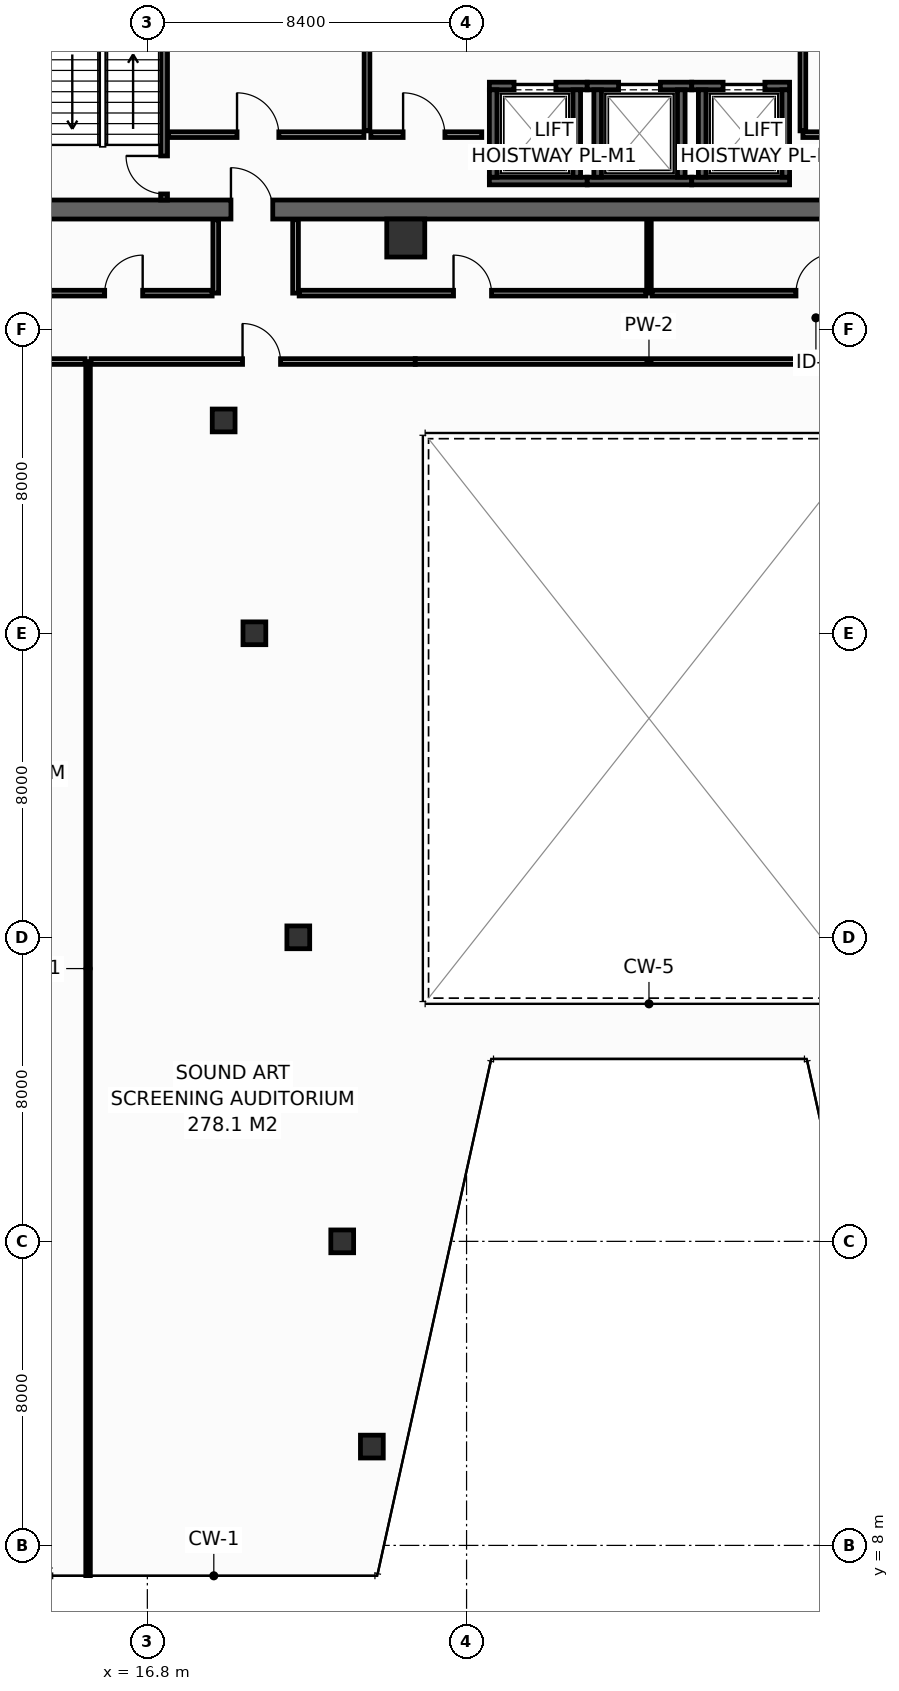
"""IFC4 building model, lengths in metres.
Left out: names, types, materials, properties, quantities, classifications, styles, units other than length and angle.
Written with IfcOpenShell. Run it as: python <this file> out.ifc"""

import sys

from ifc_helpers import new_model, si_unit, direction, frame, frame_2d, origin, origin_2d, place, context, subcontext, project, spatial, rectangle, hollow_rectangle, extrude, element, fill, save


model = new_model("IFC4")
c1 = context("Model", 3, precision=1e-05, world=origin(), true_north=direction((0.0, 1.0)))
c2 = subcontext(c1, "Body", "Model", "MODEL_VIEW")
j1 = project(units=[si_unit("LENGTHUNIT", "METRE"), si_unit("PLANEANGLEUNIT", "RADIAN")], contexts=[c1])
p1 = place(None, origin())
s1 = spatial("IfcSite", under=j1, at=p1, CompositionType="ELEMENT")
p2 = place(p1, origin())
s2 = spatial("IfcBuilding", under=s1, at=p2, CompositionType="ELEMENT")
p3 = place(p2, frame((0.0, 0.0, 148.6)))
s3 = spatial("IfcBuildingStorey", under=s2, at=p3, CompositionType="ELEMENT", Elevation=148.6)
p4 = place(p3, frame((13.6, 43.15, 0.0), z_axis=(0.0, 0.0, 1.0), x_axis=(1.0, 0.0, 0.0)))
e1 = element("IfcWall", 1, at=p4, inside=s3, PredefinedType="SHEAR", context=c2, shape_type="SweptSolid", body=[
    extrude(rectangle(XDim=32.7, YDim=0.5, at=frame_2d((16.35, 0.0))), origin(), (0.0, 0.0, 1.0), 3.55),
])
p5 = place(p4, frame((5.4, 0.0, 0.0)))
e2 = element("IfcOpeningElement", 2, at=p5, cuts=e1, PredefinedType="OPENING", context=c2, shape_type="SweptSolid", body=[
    extrude(rectangle(XDim=1.1, YDim=2.15, at=frame_2d((0.55, 1.075))), frame((0.0, 0.26, 0.0), z_axis=(0.0, -1.0, 0.0), x_axis=(1.0, 0.0, 0.0)), (0.0, 0.0, 1.0), 0.52),
])
p6 = place(p4, frame((25.6, 0.0, 0.0)))
e3 = element("IfcOpeningElement", 3, at=p6, cuts=e1, PredefinedType="OPENING", context=c2, shape_type="SweptSolid", body=[
    extrude(rectangle(XDim=1.1, YDim=2.15, at=frame_2d((0.55, 1.075))), frame((0.0, 0.26, 0.0), z_axis=(0.0, -1.0, 0.0), x_axis=(1.0, 0.0, 0.0)), (0.0, 0.0, 1.0), 0.52),
])
p7 = place(p3, frame((23.6, 42.4, 0.0), z_axis=(0.0, 0.0, 1.0), x_axis=(1.0, 0.0, 0.0)))
e4 = element("IfcColumn", 4, at=p7, inside=s3, PredefinedType="COLUMN", context=c2, shape_type="SweptSolid", body=[
    extrude(hollow_rectangle(XDim=1.0, YDim=1.0, WallThickness=0.045, at=origin_2d()), origin(), (0.0, 0.0, 1.0), 3.8),
])
for number, where, z_axis, x_axis in (
    (5, (22.708, 10.6, 0.0), (0.0, 0.0, 1.0), (1.0, 0.0, 0.0)),
    (6, (21.928, 16.0, 0.0), (0.0, 0.0, 1.0), (1.0, 0.0, 0.0)),
    (7, (20.772, 24.0, 0.0), (0.0, 0.0, 1.0), (1.0, 0.0, 0.0)),
    (8, (19.617, 32.0, 0.0), (0.0, 0.0, 1.0), (1.0, 0.0, 0.0)),
    (9, (18.808, 37.6, 0.0), (0.0, 0.0, 1.0), (1.0, 0.0, 0.0)),
):
    element("IfcColumn", number, at=place(p3, frame(where, z_axis=z_axis, x_axis=x_axis)), inside=s3, PredefinedType="COLUMN", context=c2, shape_type="SweptSolid", body=[
        extrude(hollow_rectangle(XDim=0.6, YDim=0.6, WallThickness=0.028, at=origin_2d()), origin(), (0.0, 0.0, 1.0), 3.8),
    ])
p8 = place(p3, frame((25.8, 43.9, 0.0), z_axis=(0.0, 0.0, 1.0), x_axis=(1.0, 0.0, 0.0)))
e10 = element("IfcWall", 10, at=p8, inside=s3, PredefinedType="SHEAR", context=c2, shape_type="SweptSolid", body=[
    extrude(rectangle(XDim=2.575, YDim=0.2, at=frame_2d((1.288, 0.0))), origin(), (0.0, 0.0, 1.0), 3.55),
])
p9 = place(p3, frame((25.8, 46.4, 0.0), z_axis=(0.0, 0.0, 1.0), x_axis=(1.0, 0.0, 0.0)))
e11 = element("IfcWall", 11, at=p9, inside=s3, PredefinedType="SHEAR", context=c2, shape_type="SweptSolid", body=[
    extrude(rectangle(XDim=2.575, YDim=0.2, at=frame_2d((1.288, 0.0))), origin(), (0.0, 0.0, 1.0), 3.55),
])
p10 = place(p9, frame((0.65, 0.0, 0.0)))
e12 = element("IfcOpeningElement", 12, at=p10, cuts=e11, PredefinedType="OPENING", context=c2, shape_type="SweptSolid", body=[
    extrude(rectangle(XDim=1.1, YDim=2.2, at=frame_2d((0.55, 1.1))), frame((0.0, 0.11, 0.0), z_axis=(0.0, -1.0, 0.0), x_axis=(1.0, 0.0, 0.0)), (0.0, 0.0, 1.0), 0.22),
])
for number, where, z_axis, x_axis in (
    (13, (25.9, 44.0, 0.0), (0.0, 0.0, 1.0), (0.0, 1.0, 0.0)),
    (14, (28.1, 44.0, 0.0), (0.0, 0.0, 1.0), (0.0, 1.0, 0.0)),
):
    element("IfcWall", number, at=place(p3, frame(where, z_axis=z_axis, x_axis=x_axis)), inside=s3, PredefinedType="SHEAR", context=c2, shape_type="SweptSolid", body=[
        extrude(rectangle(XDim=2.3, YDim=0.2, at=frame_2d((1.15, 0.0))), origin(), (0.0, 0.0, 1.0), 3.55),
    ])
p11 = place(p3, frame((28.375, 43.9, 0.0), z_axis=(0.0, 0.0, 1.0), x_axis=(1.0, 0.0, 0.0)))
e15 = element("IfcWall", 15, at=p11, inside=s3, PredefinedType="SHEAR", context=c2, shape_type="SweptSolid", body=[
    extrude(rectangle(XDim=2.75, YDim=0.2, at=frame_2d((1.375, 0.0))), origin(), (0.0, 0.0, 1.0), 3.55),
])
p12 = place(p3, frame((28.375, 46.4, 0.0), z_axis=(0.0, 0.0, 1.0), x_axis=(1.0, 0.0, 0.0)))
e16 = element("IfcWall", 16, at=p12, inside=s3, PredefinedType="SHEAR", context=c2, shape_type="SweptSolid", body=[
    extrude(rectangle(XDim=2.75, YDim=0.2, at=frame_2d((1.375, 0.0))), origin(), (0.0, 0.0, 1.0), 3.55),
])
p13 = place(p12, frame((0.825, 0.0, 0.0)))
e17 = element("IfcOpeningElement", 17, at=p13, cuts=e16, PredefinedType="OPENING", context=c2, shape_type="SweptSolid", body=[
    extrude(rectangle(XDim=1.1, YDim=2.2, at=frame_2d((0.55, 1.1))), frame((0.0, 0.11, 0.0), z_axis=(0.0, -1.0, 0.0), x_axis=(1.0, 0.0, 0.0)), (0.0, 0.0, 1.0), 0.22),
])
for number, where, z_axis, x_axis in (
    (18, (28.65, 44.0, 0.0), (0.0, 0.0, 1.0), (0.0, 1.0, 0.0)),
    (19, (30.85, 44.0, 0.0), (0.0, 0.0, 1.0), (0.0, 1.0, 0.0)),
):
    element("IfcWall", number, at=place(p3, frame(where, z_axis=z_axis, x_axis=x_axis)), inside=s3, PredefinedType="SHEAR", context=c2, shape_type="SweptSolid", body=[
        extrude(rectangle(XDim=2.3, YDim=0.2, at=frame_2d((1.15, 0.0))), origin(), (0.0, 0.0, 1.0), 3.55),
    ])
p14 = place(p3, frame((31.125, 43.9, 0.0), z_axis=(0.0, 0.0, 1.0), x_axis=(1.0, 0.0, 0.0)))
e20 = element("IfcWall", 20, at=p14, inside=s3, PredefinedType="SHEAR", context=c2, shape_type="SweptSolid", body=[
    extrude(rectangle(XDim=2.575, YDim=0.2, at=frame_2d((1.288, 0.0))), origin(), (0.0, 0.0, 1.0), 3.55),
])
p15 = place(p3, frame((31.125, 46.4, 0.0), z_axis=(0.0, 0.0, 1.0), x_axis=(1.0, 0.0, 0.0)))
e21 = element("IfcWall", 21, at=p15, inside=s3, PredefinedType="SHEAR", context=c2, shape_type="SweptSolid", body=[
    extrude(rectangle(XDim=2.575, YDim=0.2, at=frame_2d((1.288, 0.0))), origin(), (0.0, 0.0, 1.0), 3.55),
])
p16 = place(p15, frame((0.825, 0.0, 0.0)))
e22 = element("IfcOpeningElement", 22, at=p16, cuts=e21, PredefinedType="OPENING", context=c2, shape_type="SweptSolid", body=[
    extrude(rectangle(XDim=1.1, YDim=2.2, at=frame_2d((0.55, 1.1))), frame((0.0, 0.11, 0.0), z_axis=(0.0, -1.0, 0.0), x_axis=(1.0, 0.0, 0.0)), (0.0, 0.0, 1.0), 0.22),
])
for number, where, z_axis, x_axis in (
    (23, (31.4, 44.0, 0.0), (0.0, 0.0, 1.0), (0.0, 1.0, 0.0)),
    (24, (33.6, 44.0, 0.0), (0.0, 0.0, 1.0), (0.0, 1.0, 0.0)),
):
    element("IfcWall", number, at=place(p3, frame(where, z_axis=z_axis, x_axis=x_axis)), inside=s3, PredefinedType="SHEAR", context=c2, shape_type="SweptSolid", body=[
        extrude(rectangle(XDim=2.3, YDim=0.2, at=frame_2d((1.15, 0.0))), origin(), (0.0, 0.0, 1.0), 3.55),
    ])
p17 = place(p3, frame((17.24, 43.4, 0.0), z_axis=(0.0, 0.0, 1.0), x_axis=(0.0, 1.0, 0.0)))
e25 = element("IfcWall", 25, at=p17, inside=s3, PredefinedType="SHEAR", context=c2, shape_type="SweptSolid", body=[
    extrude(rectangle(XDim=10.4, YDim=0.18, at=frame_2d((5.2, 0.0))), origin(), (0.0, 0.0, 1.0), 3.55),
])
p18 = place(p17, frame((0.16, 0.0, 0.0)))
e26 = element("IfcOpeningElement", 26, at=p18, cuts=e25, PredefinedType="OPENING", context=c2, shape_type="SweptSolid", body=[
    extrude(rectangle(XDim=1.0, YDim=2.15, at=frame_2d((0.5, 1.075))), frame((0.0, 0.1, 0.0), z_axis=(0.0, -1.0, 0.0), x_axis=(1.0, 0.0, 0.0)), (0.0, 0.0, 1.0), 0.2),
])
p19 = place(p3, frame((17.36, 45.12, 0.0), z_axis=(0.0, 0.0, 1.0), x_axis=(1.0, 0.0, 0.0)))
e27 = element("IfcWall", 27, at=p19, inside=s3, PredefinedType="PARTITIONING", context=c2, shape_type="SweptSolid", body=[
    extrude(rectangle(XDim=5.14, YDim=0.15, at=frame_2d((2.57, 0.0))), origin(), (0.0, 0.0, 1.0), 3.55),
])
p20 = place(p19, frame((1.8, 0.0, 0.0)))
e28 = element("IfcOpeningElement", 28, at=p20, cuts=e27, PredefinedType="OPENING", context=c2, shape_type="SweptSolid", body=[
    extrude(rectangle(XDim=1.1, YDim=2.15, at=frame_2d((0.55, 1.075))), frame((0.0, 0.085, 0.0), z_axis=(0.0, -1.0, 0.0), x_axis=(1.0, 0.0, 0.0)), (0.0, 0.0, 1.0), 0.17),
])
p21 = place(p3, frame((22.58, 50.55, 0.0), z_axis=(0.0, 0.0, 1.0), x_axis=(0.0, -1.0, 0.0)))
e29 = element("IfcWall", 29, at=p21, inside=s3, PredefinedType="PARTITIONING", context=c2, shape_type="SweptSolid", body=[
    extrude(rectangle(XDim=5.33, YDim=0.15, at=frame_2d((2.665, 0.0))), origin(), (0.0, 0.0, 1.0), 3.55),
])
p22 = place(p21, frame((1.8, 0.0, 0.0)))
e30 = element("IfcOpeningElement", 30, at=p22, cuts=e29, PredefinedType="OPENING", context=c2, shape_type="SweptSolid", body=[
    extrude(rectangle(XDim=1.1, YDim=2.15, at=frame_2d((0.55, 1.075))), frame((0.0, 0.085, 0.0), z_axis=(0.0, -1.0, 0.0), x_axis=(1.0, 0.0, 0.0)), (0.0, 0.0, 1.0), 0.17),
])
p23 = place(p3, frame((22.68, 45.12, 0.0), z_axis=(0.0, 0.0, 1.0), x_axis=(1.0, 0.0, 0.0)))
e31 = element("IfcWall", 31, at=p23, inside=s3, PredefinedType="PARTITIONING", context=c2, shape_type="SweptSolid", body=[
    extrude(rectangle(XDim=2.92, YDim=0.15, at=frame_2d((1.46, 0.0))), origin(), (0.0, 0.0, 1.0), 3.55),
])
p24 = place(p23, frame((0.85, 0.0, 0.0)))
e32 = element("IfcOpeningElement", 32, at=p24, cuts=e31, PredefinedType="OPENING", context=c2, shape_type="SweptSolid", body=[
    extrude(rectangle(XDim=1.1, YDim=2.15, at=frame_2d((0.55, 1.075))), frame((0.0, 0.085, 0.0), z_axis=(0.0, -1.0, 0.0), x_axis=(1.0, 0.0, 0.0)), (0.0, 0.0, 1.0), 0.17),
])
p25 = place(p3, frame((34.05, 45.12, 0.0), z_axis=(0.0, 0.0, 1.0), x_axis=(1.0, 0.0, 0.0)))
e33 = element("IfcWall", 33, at=p25, inside=s3, PredefinedType="PARTITIONING", context=c2, shape_type="SweptSolid", body=[
    extrude(rectangle(XDim=8.45, YDim=0.15, at=frame_2d((4.225, 0.0))), origin(), (0.0, 0.0, 1.0), 3.55),
])
p26 = place(p25, frame((3.6, 0.0, 0.0)))
e34 = element("IfcOpeningElement", 34, at=p26, cuts=e33, PredefinedType="OPENING", context=c2, shape_type="SweptSolid", body=[
    extrude(rectangle(XDim=0.95, YDim=2.15, at=frame_2d((0.475, 1.075))), frame((0.0, 0.085, 0.0), z_axis=(0.0, -1.0, 0.0), x_axis=(1.0, 0.0, 0.0)), (0.0, 0.0, 1.0), 0.17),
])
p27 = place(p3, frame((34.05, 45.22, 0.0), z_axis=(0.0, 0.0, 1.0), x_axis=(0.0, 1.0, 0.0)))
e35 = element("IfcWall", 35, at=p27, inside=s3, PredefinedType="PARTITIONING", context=c2, shape_type="SweptSolid", body=[
    extrude(rectangle(XDim=2.43, YDim=0.15, at=frame_2d((1.215, 0.0))), origin(), (0.0, 0.0, 1.0), 3.55),
])
for number, where, z_axis, x_axis in (
    (36, (18.6, 40.95, 0.0), (0.0, 0.0, 1.0), (0.0, 1.0, 0.0)),
    (37, (20.7, 40.95, 0.0), (0.0, 0.0, 1.0), (0.0, 1.0, 0.0)),
):
    element("IfcWall", number, at=place(p3, frame(where, z_axis=z_axis, x_axis=x_axis)), inside=s3, PredefinedType="PARTITIONING", context=c2, shape_type="SweptSolid", body=[
        extrude(rectangle(XDim=1.93, YDim=0.15, at=frame_2d((0.965, 0.0))), origin(), (0.0, 0.0, 1.0), 3.55),
    ])
p28 = place(p3, frame((13.85, 40.95, 0.0), z_axis=(0.0, 0.0, 1.0), x_axis=(1.0, 0.0, 0.0)))
e38 = element("IfcWall", 38, at=p28, inside=s3, PredefinedType="PARTITIONING", context=c2, shape_type="SweptSolid", body=[
    extrude(rectangle(XDim=4.655, YDim=0.15, at=frame_2d((2.327, 0.0))), origin(), (0.0, 0.0, 1.0), 3.55),
])
p29 = place(p28, frame((1.827, 0.0, 0.0)))
e39 = element("IfcOpeningElement", 39, at=p29, cuts=e38, PredefinedType="OPENING", context=c2, shape_type="SweptSolid", body=[
    extrude(rectangle(XDim=1.0, YDim=2.15, at=frame_2d((0.5, 1.075))), frame((0.0, 0.085, 0.0), z_axis=(0.0, -1.0, 0.0), x_axis=(1.0, 0.0, 0.0)), (0.0, 0.0, 1.0), 0.17),
])
p30 = place(p3, frame((30.0, 40.95, 0.0), z_axis=(0.0, 0.0, 1.0), x_axis=(0.0, 1.0, 0.0)))
e40 = element("IfcWall", 40, at=p30, inside=s3, PredefinedType="PARTITIONING", context=c2, shape_type="SweptSolid", body=[
    extrude(rectangle(XDim=1.93, YDim=0.12, at=frame_2d((0.965, 0.0))), origin(), (0.0, 0.0, 1.0), 2.835),
])
p31 = place(p3, frame((20.795, 40.95, 0.0), z_axis=(0.0, 0.0, 1.0), x_axis=(1.0, 0.0, 0.0)))
e41 = element("IfcWall", 41, at=p31, inside=s3, PredefinedType="PARTITIONING", context=c2, shape_type="SweptSolid", body=[
    extrude(rectangle(XDim=9.125, YDim=0.15, at=frame_2d((4.562, 0.0))), origin(), (0.0, 0.0, 1.0), 2.835),
])
p32 = place(p31, frame((4.062, 0.0, 0.0)))
e42 = element("IfcOpeningElement", 42, at=p32, cuts=e41, PredefinedType="OPENING", context=c2, shape_type="SweptSolid", body=[
    extrude(rectangle(XDim=1.0, YDim=2.15, at=frame_2d((0.5, 1.075))), frame((0.0, 0.085, 0.0), z_axis=(0.0, -1.0, 0.0), x_axis=(1.0, 0.0, 0.0)), (0.0, 0.0, 1.0), 0.17),
])
p33 = place(p3, frame((30.08, 40.95, 0.0), z_axis=(0.0, 0.0, 1.0), x_axis=(1.0, 0.0, 0.0)))
e43 = element("IfcWall", 43, at=p33, inside=s3, PredefinedType="PARTITIONING", context=c2, shape_type="SweptSolid", body=[
    extrude(rectangle(XDim=8.625, YDim=0.15, at=frame_2d((4.312, 0.0))), origin(), (0.0, 0.0, 1.0), 2.835),
])
p34 = place(p33, frame((3.788, 0.0, 0.0)))
e44 = element("IfcOpeningElement", 44, at=p34, cuts=e43, PredefinedType="OPENING", context=c2, shape_type="SweptSolid", body=[
    extrude(rectangle(XDim=1.05, YDim=2.15, at=frame_2d((0.525, 1.075))), frame((0.0, 0.085, 0.0), z_axis=(0.0, -1.0, 0.0), x_axis=(1.0, 0.0, 0.0)), (0.0, 0.0, 1.0), 0.17),
])
p35 = place(p3, frame((15.24, 7.205, 0.0), z_axis=(0.0, 0.0, 1.0), x_axis=(0.0, 1.0, 0.0)))
e45 = element("IfcWall", 45, at=p35, inside=s3, PredefinedType="PARTITIONING", context=c2, shape_type="SweptSolid", body=[
    extrude(rectangle(XDim=31.945, YDim=0.12, at=frame_2d((15.972, 0.0))), origin(), (0.0, 0.0, 1.0), 2.835),
])
p36 = place(p3, frame((6.334, 39.15, 0.0), z_axis=(0.0, 0.0, 1.0), x_axis=(1.0, 0.0, 0.0)))
e46 = element("IfcWall", 46, at=p36, inside=s3, PredefinedType="PARTITIONING", context=c2, shape_type="SweptSolid", body=[
    extrude(rectangle(XDim=8.826, YDim=0.15, at=frame_2d((4.413, 0.0))), origin(), (0.0, 0.0, 1.0), 3.035),
])
p37 = place(p36, frame((3.913, 0.0, 0.0)))
e47 = element("IfcOpeningElement", 47, at=p37, cuts=e46, PredefinedType="OPENING", context=c2, shape_type="SweptSolid", body=[
    extrude(rectangle(XDim=1.0, YDim=2.15, at=frame_2d((0.5, 1.075))), frame((0.0, 0.085, 0.0), z_axis=(0.0, -1.0, 0.0), x_axis=(1.0, 0.0, 0.0)), (0.0, 0.0, 1.0), 0.17),
])
p38 = place(p3, frame((15.32, 39.15, 0.0), z_axis=(0.0, 0.0, 1.0), x_axis=(1.0, 0.0, 0.0)))
e48 = element("IfcWall", 48, at=p38, inside=s3, PredefinedType="PARTITIONING", context=c2, shape_type="SweptSolid", body=[
    extrude(rectangle(XDim=8.53, YDim=0.15, at=frame_2d((4.265, 0.0))), origin(), (0.0, 0.0, 1.0), 2.835),
])
p39 = place(p38, frame((3.985, 0.0, 0.0)))
e49 = element("IfcOpeningElement", 49, at=p39, cuts=e48, PredefinedType="OPENING", context=c2, shape_type="SweptSolid", body=[
    extrude(rectangle(XDim=1.0, YDim=2.15, at=frame_2d((0.5, 1.075))), frame((0.0, 0.085, 0.0), z_axis=(0.0, -1.0, 0.0), x_axis=(1.0, 0.0, 0.0)), (0.0, 0.0, 1.0), 0.17),
])
p40 = place(p3, frame((23.85, 39.15, 0.0), z_axis=(0.0, 0.0, 1.0), x_axis=(1.0, 0.0, 0.0)))
e50 = element("IfcWall", 50, at=p40, inside=s3, PredefinedType="PARTITIONING", context=c2, shape_type="SweptSolid", body=[
    extrude(rectangle(XDim=12.3, YDim=0.15, at=frame_2d((6.15, 0.0))), origin(), (0.0, 0.0, 1.0), 3.55),
])
p41 = place(p10, origin())
e51 = element("IfcDoor", 51, at=p41, inside=s3, OperationType="SLIDING_TO_LEFT", PredefinedType="DOOR", context=c2, shape_type="SweptSolid", body=[
    extrude(rectangle(XDim=1.1, YDim=2.2, at=frame_2d((0.55, 1.1))), frame((0.0, 0.025, 0.0), z_axis=(0.0, -1.0, 0.0), x_axis=(1.0, 0.0, 0.0)), (0.0, 0.0, 1.0), 0.05),
])
fill(e12, e51)
p42 = place(p13, origin())
e52 = element("IfcDoor", 52, at=p42, inside=s3, OperationType="SLIDING_TO_LEFT", PredefinedType="DOOR", context=c2, shape_type="SweptSolid", body=[
    extrude(rectangle(XDim=1.1, YDim=2.2, at=frame_2d((0.55, 1.1))), frame((0.0, 0.025, 0.0), z_axis=(0.0, -1.0, 0.0), x_axis=(1.0, 0.0, 0.0)), (0.0, 0.0, 1.0), 0.05),
])
fill(e17, e52)
p43 = place(p16, origin())
e53 = element("IfcDoor", 53, at=p43, inside=s3, OperationType="SLIDING_TO_LEFT", PredefinedType="DOOR", context=c2, shape_type="SweptSolid", body=[
    extrude(rectangle(XDim=1.1, YDim=2.2, at=frame_2d((0.55, 1.1))), frame((0.0, 0.025, 0.0), z_axis=(0.0, -1.0, 0.0), x_axis=(1.0, 0.0, 0.0)), (0.0, 0.0, 1.0), 0.05),
])
fill(e22, e53)
p44 = place(p18, origin())
e54 = element("IfcDoor", 54, at=p44, inside=s3, OperationType="SINGLE_SWING_RIGHT", PredefinedType="DOOR", context=c2, shape_type="SweptSolid", body=[
    extrude(rectangle(XDim=1.0, YDim=2.15, at=frame_2d((0.5, 1.075))), frame((0.0, 0.025, 0.0), z_axis=(0.0, -1.0, 0.0), x_axis=(1.0, 0.0, 0.0)), (0.0, 0.0, 1.0), 0.05),
])
fill(e26, e54)
p45 = place(p20, origin())
e55 = element("IfcDoor", 55, at=p45, inside=s3, OperationType="SINGLE_SWING_LEFT", PredefinedType="DOOR", context=c2, shape_type="SweptSolid", body=[
    extrude(rectangle(XDim=1.1, YDim=2.15, at=frame_2d((0.55, 1.075))), frame((0.0, 0.025, 0.0), z_axis=(0.0, -1.0, 0.0), x_axis=(1.0, 0.0, 0.0)), (0.0, 0.0, 1.0), 0.05),
])
fill(e28, e55)
p46 = place(p24, origin())
e56 = element("IfcDoor", 56, at=p46, inside=s3, OperationType="SINGLE_SWING_LEFT", PredefinedType="DOOR", context=c2, shape_type="SweptSolid", body=[
    extrude(rectangle(XDim=1.1, YDim=2.15, at=frame_2d((0.55, 1.075))), frame((0.0, 0.025, 0.0), z_axis=(0.0, -1.0, 0.0), x_axis=(1.0, 0.0, 0.0)), (0.0, 0.0, 1.0), 0.05),
])
fill(e32, e56)
p47 = place(p5, origin())
e57 = element("IfcDoor", 57, at=p47, inside=s3, OperationType="SINGLE_SWING_LEFT", PredefinedType="DOOR", context=c2, shape_type="SweptSolid", body=[
    extrude(rectangle(XDim=1.1, YDim=2.15, at=frame_2d((0.55, 1.075))), frame((0.0, 0.025, 0.0), z_axis=(0.0, -1.0, 0.0), x_axis=(1.0, 0.0, 0.0)), (0.0, 0.0, 1.0), 0.05),
])
fill(e2, e57)
p48 = place(p29, origin())
e58 = element("IfcDoor", 58, at=p48, inside=s3, OperationType="SINGLE_SWING_RIGHT", PredefinedType="DOOR", context=c2, shape_type="SweptSolid", body=[
    extrude(rectangle(XDim=1.0, YDim=2.15, at=frame_2d((0.5, 1.075))), frame((0.0, 0.025, 0.0), z_axis=(0.0, -1.0, 0.0), x_axis=(1.0, 0.0, 0.0)), (0.0, 0.0, 1.0), 0.05),
])
fill(e39, e58)
p49 = place(p32, origin())
e59 = element("IfcDoor", 59, at=p49, inside=s3, OperationType="SINGLE_SWING_LEFT", PredefinedType="DOOR", context=c2, shape_type="SweptSolid", body=[
    extrude(rectangle(XDim=1.0, YDim=2.15, at=frame_2d((0.5, 1.075))), frame((0.0, 0.025, 0.0), z_axis=(0.0, -1.0, 0.0), x_axis=(1.0, 0.0, 0.0)), (0.0, 0.0, 1.0), 0.05),
])
fill(e42, e59)
p50 = place(p34, origin())
e60 = element("IfcDoor", 60, at=p50, inside=s3, OperationType="SINGLE_SWING_RIGHT", PredefinedType="DOOR", context=c2, shape_type="SweptSolid", body=[
    extrude(rectangle(XDim=1.05, YDim=2.15, at=frame_2d((0.525, 1.075))), frame((0.0, 0.025, 0.0), z_axis=(0.0, -1.0, 0.0), x_axis=(1.0, 0.0, 0.0)), (0.0, 0.0, 1.0), 0.05),
])
fill(e44, e60)
p51 = place(p39, origin())
e61 = element("IfcDoor", 61, at=p51, inside=s3, OperationType="SINGLE_SWING_LEFT", PredefinedType="DOOR", context=c2, shape_type="SweptSolid", body=[
    extrude(rectangle(XDim=1.0, YDim=2.15, at=frame_2d((0.5, 1.075))), frame((0.0, 0.025, 0.0), z_axis=(0.0, -1.0, 0.0), x_axis=(1.0, 0.0, 0.0)), (0.0, 0.0, 1.0), 0.05),
])
fill(e49, e61)
save(model, sys.argv[1])
